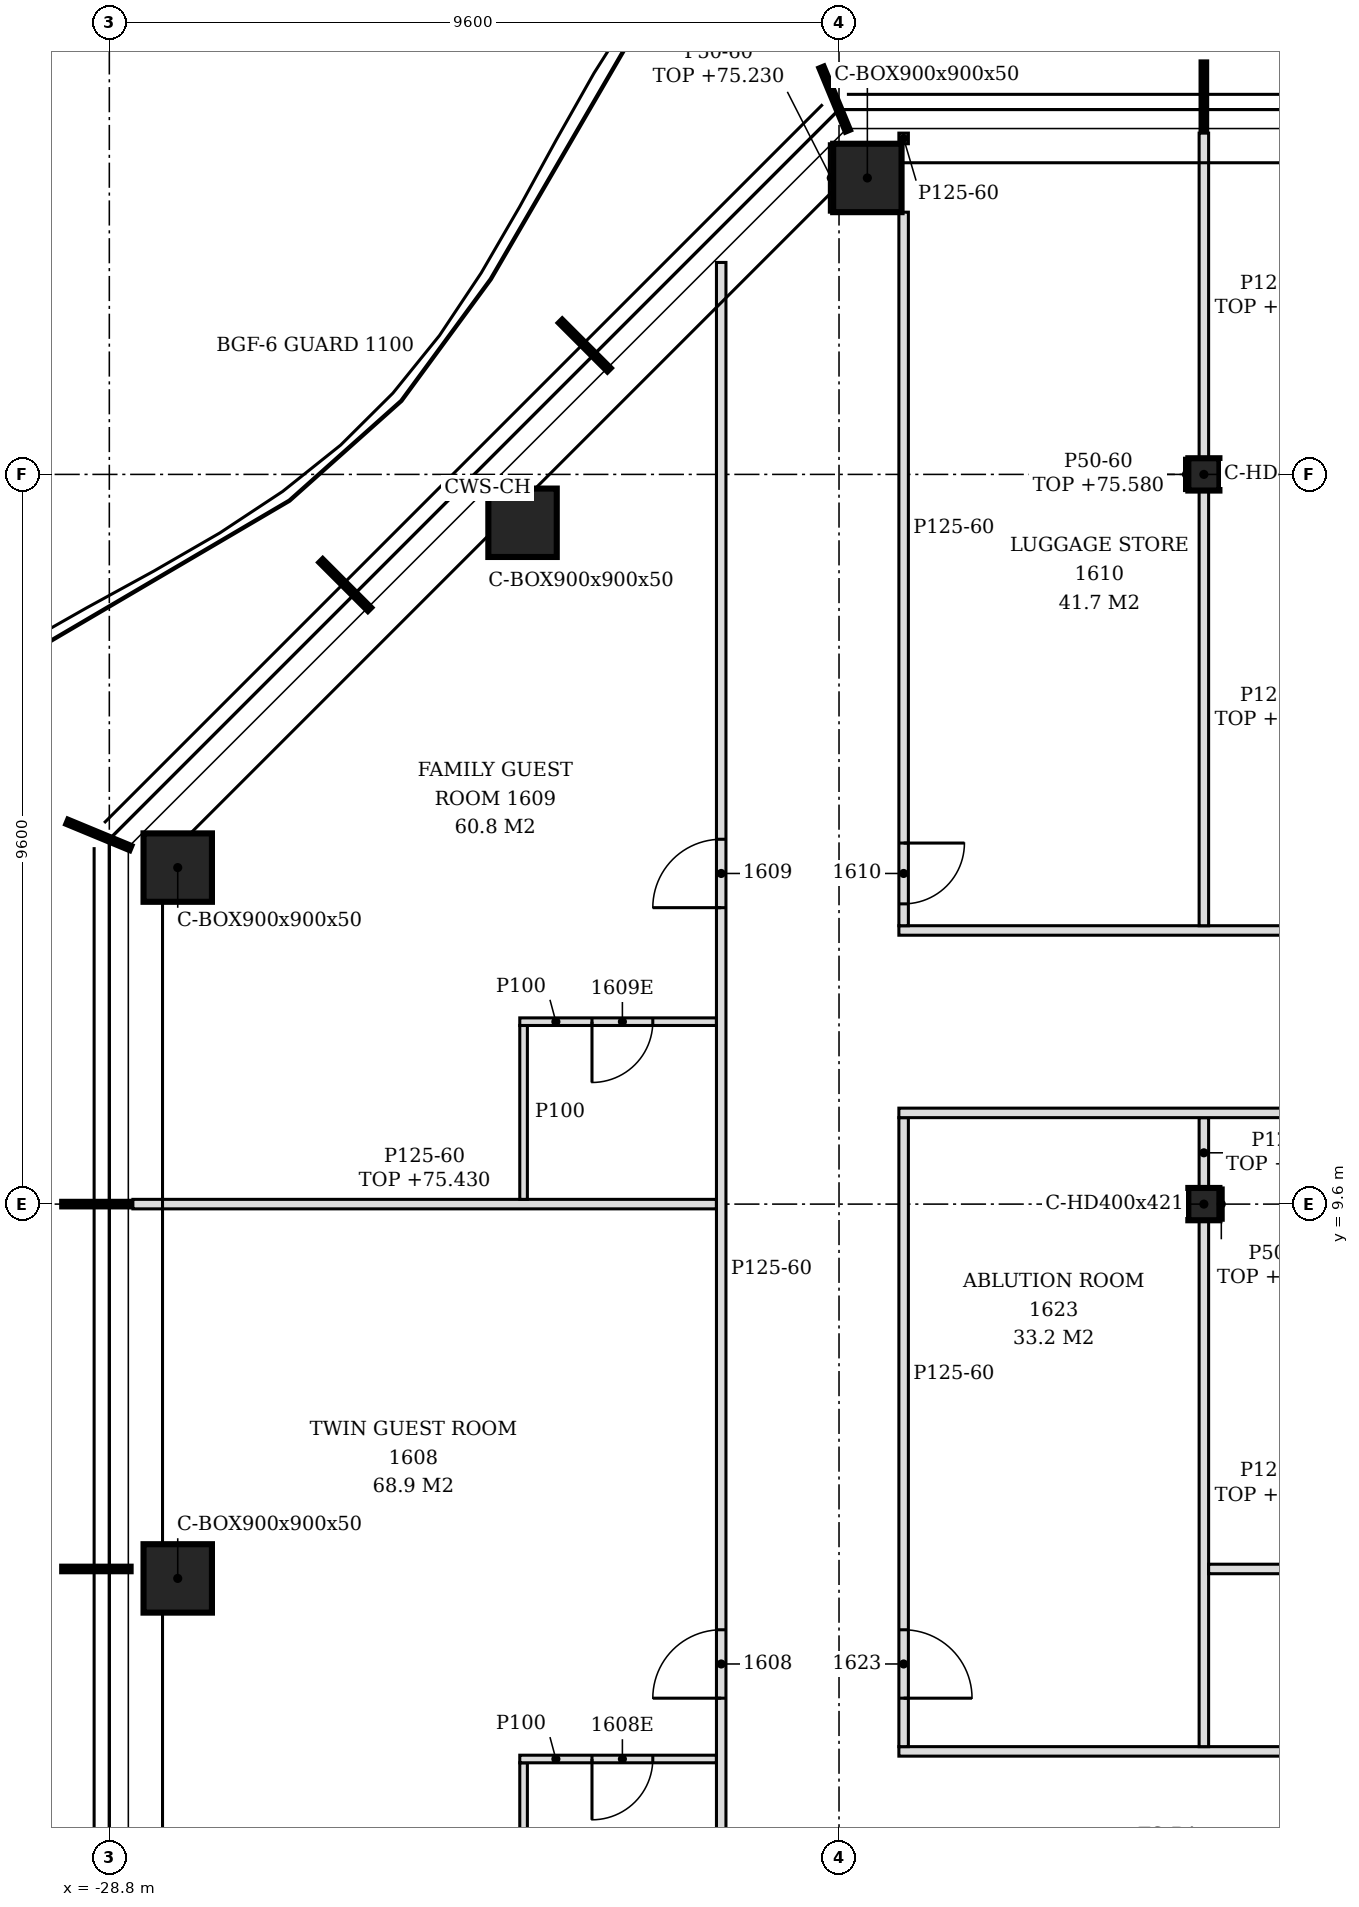
"""IFC4 building model, lengths in metres.
Left out: names, types, materials, properties, quantities, classifications, styles, units other than length and angle.
Written with IfcOpenShell. Run it as: python <this file> out.ifc"""

import sys

from ifc_helpers import new_model, si_unit, direction, frame, frame_2d, origin, origin_2d, place, context, subcontext, project, spatial, polyline, rectangle, hollow_rectangle, i_section, outline, extrude, element, fill, save


model = new_model("IFC4")
c1 = context("Model", 3, precision=1e-05, world=origin(), true_north=direction((0.0, 1.0)))
c2 = subcontext(c1, "Body", "Model", "MODEL_VIEW")
j1 = project(units=[si_unit("LENGTHUNIT", "METRE"), si_unit("PLANEANGLEUNIT", "RADIAN")], contexts=[c1])
p1 = place(None, origin())
s1 = spatial("IfcSite", under=j1, at=p1, CompositionType="ELEMENT")
p2 = place(p1, origin())
s2 = spatial("IfcBuilding", under=s1, at=p2, CompositionType="ELEMENT")
p3 = place(p2, frame((0.0, 0.0, 72.6)))
s3 = spatial("IfcBuildingStorey", under=s2, at=p3, CompositionType="ELEMENT", Elevation=72.6)
for number, where, z_axis, x_axis in (
    (1, (-18.827, 23.1, -0.15), (0.0, 0.0, 1.0), (1.0, 0.0, 0.0)),
    (2, (-23.364, 18.564, -0.15), (0.0, 0.0, 1.0), (1.0, 0.0, 0.0)),
    (3, (-27.9, 14.027, -0.15), (0.0, 0.0, 1.0), (1.0, 0.0, 0.0)),
    (4, (-27.9, 4.676, -0.15), (0.0, 0.0, 1.0), (1.0, 0.0, 0.0)),
):
    element("IfcColumn", number, at=place(p3, frame(where, z_axis=z_axis, x_axis=x_axis)), inside=s3, PredefinedType="COLUMN", context=c2, shape_type="SweptSolid", body=[
        extrude(hollow_rectangle(XDim=0.9, YDim=0.9, WallThickness=0.05, at=origin_2d()), origin(), (0.0, 0.0, 1.0), 3.6),
    ])
for number, where, z_axis, x_axis in (
    (5, (-14.4, 9.6, -0.15), (0.0, 0.0, 1.0), (1.0, 0.0, 0.0)),
    (6, (-14.4, 19.2, -0.15), (0.0, 0.0, 1.0), (1.0, 0.0, 0.0)),
):
    element("IfcColumn", number, at=place(p3, frame(where, z_axis=z_axis, x_axis=x_axis)), inside=s3, PredefinedType="COLUMN", context=c2, shape_type="SweptSolid", body=[
        extrude(i_section(OverallWidth=0.409, OverallDepth=0.425, WebThickness=0.033, FlangeThickness=0.052, FilletRadius=0.015, at=origin_2d()), origin(), (0.0, 0.0, 1.0), 3.6),
    ])
p4 = place(p3, frame((-20.75, -17.887, 0.0), z_axis=(0.0, 0.0, 1.0), x_axis=(0.0, 1.0, 0.0)))
e7 = element("IfcWall", 7, at=p4, inside=s3, PredefinedType="PARTITIONING", context=c2, shape_type="SweptSolid", body=[
    extrude(outline(polyline([(0.0, 0.0), (39.876, 0.0), (39.876, 3.45), (39.622, 3.45), (39.62, 2.63), (38.507, 2.63), (38.505, 3.45), (37.183, 3.45), (37.18, 2.98), (36.992, 2.98), (36.99, 3.45), (32.397, 3.45), (32.396, 2.83), (32.177, 2.83), (32.176, 3.45), (27.597, 3.45), (27.595, 2.83), (27.377, 2.83), (27.375, 3.45), (22.798, 3.45), (22.795, 2.83), (22.577, 2.83), (22.575, 3.45), (17.998, 3.45), (17.996, 2.83), (17.778, 2.83), (17.775, 3.45), (13.198, 3.45), (13.196, 2.83), (12.978, 2.83), (12.976, 3.45), (8.397, 3.45), (8.396, 2.83), (8.177, 2.83), (8.176, 3.45), (3.597, 3.45), (3.595, 2.83), (3.377, 2.83), (3.375, 3.45), (0.0, 3.45), (0.0, 0.0)])), frame((0.0, 0.062, 0.0), z_axis=(0.0, -1.0, 0.0), x_axis=(1.0, 0.0, 0.0)), (0.0, 0.0, 1.0), 0.125),
])
p5 = place(p4, frame((4.738, 0.0, 0.0)))
e8 = element("IfcOpeningElement", 8, at=p5, cuts=e7, PredefinedType="OPENING", context=c2, shape_type="SweptSolid", body=[
    extrude(rectangle(XDim=0.9, YDim=2.1, at=frame_2d((0.45, 1.05))), frame((0.0, 0.073, 0.0), z_axis=(0.0, -1.0, 0.0), x_axis=(1.0, 0.0, 0.0)), (0.0, 0.0, 1.0), 0.145),
])
p6 = place(p4, frame((13.387, 0.0, 0.0)))
e9 = element("IfcOpeningElement", 9, at=p6, cuts=e7, PredefinedType="OPENING", context=c2, shape_type="SweptSolid", body=[
    extrude(rectangle(XDim=0.9, YDim=2.1, at=frame_2d((0.45, 1.05))), frame((0.0, 0.073, 0.0), z_axis=(0.0, -1.0, 0.0), x_axis=(1.0, 0.0, 0.0)), (0.0, 0.0, 1.0), 0.145),
])
p7 = place(p4, frame((20.988, 0.0, 0.0)))
e10 = element("IfcOpeningElement", 10, at=p7, cuts=e7, PredefinedType="OPENING", context=c2, shape_type="SweptSolid", body=[
    extrude(rectangle(XDim=0.9, YDim=2.1, at=frame_2d((0.45, 1.05))), frame((0.0, 0.073, 0.0), z_axis=(0.0, -1.0, 0.0), x_axis=(1.0, 0.0, 0.0)), (0.0, 0.0, 1.0), 0.145),
])
p8 = place(p4, frame((31.387, 0.0, 0.0)))
e11 = element("IfcOpeningElement", 11, at=p8, cuts=e7, PredefinedType="OPENING", context=c2, shape_type="SweptSolid", body=[
    extrude(rectangle(XDim=0.9, YDim=2.1, at=frame_2d((0.45, 1.05))), frame((0.0, 0.073, 0.0), z_axis=(0.0, -1.0, 0.0), x_axis=(1.0, 0.0, 0.0)), (0.0, 0.0, 1.0), 0.145),
])
p9 = place(p3, frame((-23.35, 0.062, 0.0), z_axis=(0.0, 0.0, 1.0), x_axis=(0.0, 1.0, 0.0)))
e12 = element("IfcWall", 12, at=p9, inside=s3, PredefinedType="PARTITIONING", context=c2, shape_type="SweptSolid", body=[
    extrude(outline(polyline([(0.0, 0.0), (2.188, 0.0), (2.188, 3.45), (0.048, 3.45), (0.045, 2.83), (0.0, 2.83), (0.0, 0.0)])), frame((0.0, 0.05, 0.0), z_axis=(0.0, -1.0, 0.0), x_axis=(1.0, 0.0, 0.0)), (0.0, 0.0, 1.0), 0.1),
])
p10 = place(p3, frame((-23.4, 2.3, 0.0), z_axis=(0.0, 0.0, 1.0), x_axis=(1.0, 0.0, 0.0)))
e13 = element("IfcWall", 13, at=p10, inside=s3, PredefinedType="PARTITIONING", context=c2, shape_type="SweptSolid", body=[
    extrude(rectangle(XDim=2.587, YDim=0.1, at=frame_2d((1.294, 0.0))), origin(), (0.0, 0.0, 1.0), 3.45),
])
p11 = place(p10, frame((0.95, 0.0, 0.0)))
e14 = element("IfcOpeningElement", 14, at=p11, cuts=e13, PredefinedType="OPENING", context=c2, shape_type="SweptSolid", body=[
    extrude(rectangle(XDim=0.8, YDim=2.1, at=frame_2d((0.4, 1.05))), frame((0.0, 0.06, 0.0), z_axis=(0.0, -1.0, 0.0), x_axis=(1.0, 0.0, 0.0)), (0.0, 0.0, 1.0), 0.12),
])
p12 = place(p3, frame((-18.413, 2.4, 0.0), z_axis=(0.0, 0.0, 1.0), x_axis=(1.0, 0.0, 0.0)))
e15 = element("IfcWall", 15, at=p12, inside=s3, PredefinedType="PARTITIONING", context=c2, shape_type="SweptSolid", body=[
    extrude(outline(polyline([(0.0, 0.0), (13.401, 0.0), (13.4, 3.45), (4.163, 3.45), (4.16, 2.93), (3.863, 2.93), (3.861, 3.45), (0.0, 3.45), (0.0, 0.0)])), frame((0.0, 0.062, 0.0), z_axis=(0.0, -1.0, 0.0), x_axis=(1.0, 0.0, 0.0)), (0.0, 0.0, 1.0), 0.125),
])
p13 = place(p12, frame((11.812, 0.0, 0.0)))
e16 = element("IfcOpeningElement", 16, at=p13, cuts=e15, PredefinedType="OPENING", context=c2, shape_type="SweptSolid", body=[
    extrude(rectangle(XDim=0.8, YDim=2.1, at=frame_2d((0.4, 1.05))), frame((0.0, 0.073, 0.0), z_axis=(0.0, -1.0, 0.0), x_axis=(1.0, 0.0, 0.0)), (0.0, 0.0, 1.0), 0.145),
])
p14 = place(p3, frame((-18.35, 2.462, 0.0), z_axis=(0.0, 0.0, 1.0), x_axis=(0.0, 1.0, 0.0)))
e17 = element("IfcWall", 17, at=p14, inside=s3, PredefinedType="PARTITIONING", context=c2, shape_type="SweptSolid", body=[
    extrude(outline(polyline([(0.0, 0.0), (8.275, 0.0), (8.275, 3.45), (7.248, 3.45), (7.246, 2.83), (7.028, 2.83), (7.025, 3.45), (2.448, 3.45), (2.446, 2.83), (2.228, 2.83), (2.226, 3.45), (0.0, 3.45), (0.0, 0.0)])), frame((0.0, 0.062, 0.0), z_axis=(0.0, -1.0, 0.0), x_axis=(1.0, 0.0, 0.0)), (0.0, 0.0, 1.0), 0.125),
])
p15 = place(p14, frame((0.637, 0.0, 0.0)))
e18 = element("IfcOpeningElement", 18, at=p15, cuts=e17, PredefinedType="OPENING", context=c2, shape_type="SweptSolid", body=[
    extrude(rectangle(XDim=0.9, YDim=2.1, at=frame_2d((0.45, 1.05))), frame((0.0, 0.073, 0.0), z_axis=(0.0, -1.0, 0.0), x_axis=(1.0, 0.0, 0.0)), (0.0, 0.0, 1.0), 0.145),
])
p16 = place(p3, frame((-14.4, 2.462, 0.0), z_axis=(0.0, 0.0, 1.0), x_axis=(0.0, 1.0, 0.0)))
e19 = element("IfcWall", 19, at=p16, inside=s3, PredefinedType="PARTITIONING", context=c2, shape_type="SweptSolid", body=[
    extrude(rectangle(XDim=6.925, YDim=0.125, at=frame_2d((3.462, 0.0))), origin(), (0.0, 0.0, 1.0), 2.93),
])
p17 = place(p3, frame((-14.337, 4.8, 0.0), z_axis=(0.0, 0.0, 1.0), x_axis=(1.0, 0.0, 0.0)))
e20 = element("IfcWall", 20, at=p17, inside=s3, PredefinedType="PARTITIONING", context=c2, shape_type="SweptSolid", body=[
    extrude(outline(polyline([(0.0, 0.0), (9.475, 0.0), (9.475, 2.83), (9.387, 2.83), (9.385, 2.93), (0.0, 2.93), (0.0, 0.0)])), frame((0.0, 0.062, 0.0), z_axis=(0.0, -1.0, 0.0), x_axis=(1.0, 0.0, 0.0)), (0.0, 0.0, 1.0), 0.125),
])
p18 = place(p3, frame((-28.49, 9.6, 0.0), z_axis=(0.0, 0.0, 1.0), x_axis=(1.0, 0.0, 0.0)))
e21 = element("IfcWall", 21, at=p18, inside=s3, PredefinedType="PARTITIONING", context=c2, shape_type="SweptSolid", body=[
    extrude(rectangle(XDim=7.677, YDim=0.125, at=frame_2d((3.839, 0.0))), origin(), (0.0, 0.0, 1.0), 2.83),
])
p19 = place(p3, frame((-23.35, 9.663, 0.0), z_axis=(0.0, 0.0, 1.0), x_axis=(0.0, 1.0, 0.0)))
e22 = element("IfcWall", 22, at=p19, inside=s3, PredefinedType="PARTITIONING", context=c2, shape_type="SweptSolid", body=[
    extrude(outline(polyline([(0.0, 0.0), (2.287, 0.0), (2.288, 3.45), (0.048, 3.45), (0.045, 2.83), (0.0, 2.83), (0.0, 0.0)])), frame((0.0, 0.05, 0.0), z_axis=(0.0, -1.0, 0.0), x_axis=(1.0, 0.0, 0.0)), (0.0, 0.0, 1.0), 0.1),
])
p20 = place(p3, frame((-14.4, 9.812, 0.0), z_axis=(0.0, 0.0, 1.0), x_axis=(0.0, 1.0, 0.0)))
e23 = element("IfcWall", 23, at=p20, inside=s3, PredefinedType="PARTITIONING", context=c2, shape_type="SweptSolid", body=[
    extrude(rectangle(XDim=0.925, YDim=0.125, at=frame_2d((0.462, 0.0))), origin(), (0.0, 0.0, 1.0), 2.93),
])
p21 = place(p3, frame((-18.413, 10.8, 0.0), z_axis=(0.0, 0.0, 1.0), x_axis=(1.0, 0.0, 0.0)))
e24 = element("IfcWall", 24, at=p21, inside=s3, PredefinedType="PARTITIONING", context=c2, shape_type="SweptSolid", body=[
    extrude(outline(polyline([(0.0, 0.0), (13.675, 0.0), (13.675, 2.83), (13.462, 2.83), (13.46, 3.45), (4.163, 3.45), (4.16, 2.93), (3.863, 2.93), (3.861, 3.45), (0.0, 3.45), (0.0, 0.0)])), frame((0.0, 0.062, 0.0), z_axis=(0.0, -1.0, 0.0), x_axis=(1.0, 0.0, 0.0)), (0.0, 0.0, 1.0), 0.125),
])
p22 = place(p21, frame((12.512, 0.0, 0.0)))
e25 = element("IfcOpeningElement", 25, at=p22, cuts=e24, PredefinedType="OPENING", context=c2, shape_type="SweptSolid", body=[
    extrude(rectangle(XDim=0.8, YDim=2.1, at=frame_2d((0.4, 1.05))), frame((0.0, 0.073, 0.0), z_axis=(0.0, -1.0, 0.0), x_axis=(1.0, 0.0, 0.0)), (0.0, 0.0, 1.0), 0.145),
])
p23 = place(p3, frame((-23.4, 12.0, 0.0), z_axis=(0.0, 0.0, 1.0), x_axis=(1.0, 0.0, 0.0)))
e26 = element("IfcWall", 26, at=p23, inside=s3, PredefinedType="PARTITIONING", context=c2, shape_type="SweptSolid", body=[
    extrude(rectangle(XDim=2.587, YDim=0.1, at=frame_2d((1.294, 0.0))), origin(), (0.0, 0.0, 1.0), 3.45),
])
p24 = place(p23, frame((0.95, 0.0, 0.0)))
e27 = element("IfcOpeningElement", 27, at=p24, cuts=e26, PredefinedType="OPENING", context=c2, shape_type="SweptSolid", body=[
    extrude(rectangle(XDim=0.8, YDim=2.1, at=frame_2d((0.4, 1.05))), frame((0.0, 0.06, 0.0), z_axis=(0.0, -1.0, 0.0), x_axis=(1.0, 0.0, 0.0)), (0.0, 0.0, 1.0), 0.12),
])
p25 = place(p3, frame((-18.413, 13.2, 0.0), z_axis=(0.0, 0.0, 1.0), x_axis=(1.0, 0.0, 0.0)))
e28 = element("IfcWall", 28, at=p25, inside=s3, PredefinedType="PARTITIONING", context=c2, shape_type="SweptSolid", body=[
    extrude(outline(polyline([(0.0, 0.0), (13.401, 0.0), (13.4, 3.45), (4.163, 3.45), (4.16, 2.93), (3.863, 2.93), (3.861, 3.45), (0.0, 3.45), (0.0, 0.0)])), frame((0.0, 0.062, 0.0), z_axis=(0.0, -1.0, 0.0), x_axis=(1.0, 0.0, 0.0)), (0.0, 0.0, 1.0), 0.125),
])
p26 = place(p25, frame((11.312, 0.0, 0.0)))
e29 = element("IfcOpeningElement", 29, at=p26, cuts=e28, PredefinedType="OPENING", context=c2, shape_type="SweptSolid", body=[
    extrude(rectangle(XDim=1.8, YDim=2.1, at=frame_2d((0.9, 1.05))), frame((0.0, 0.073, 0.0), z_axis=(0.0, -1.0, 0.0), x_axis=(1.0, 0.0, 0.0)), (0.0, 0.0, 1.0), 0.145),
])
p27 = place(p3, frame((-18.35, 13.262, 0.0), z_axis=(0.0, 0.0, 1.0), x_axis=(0.0, 1.0, 0.0)))
e30 = element("IfcWall", 30, at=p27, inside=s3, PredefinedType="PARTITIONING", context=c2, shape_type="SweptSolid", body=[
    extrude(outline(polyline([(0.0, 0.0), (9.387, 0.0), (9.387, 3.45), (6.032, 3.45), (6.031, 2.98), (5.843, 2.98), (5.841, 3.45), (1.248, 3.45), (1.246, 2.83), (1.028, 2.83), (1.025, 3.45), (0.0, 3.45), (0.0, 0.0)])), frame((0.0, 0.062, 0.0), z_axis=(0.0, -1.0, 0.0), x_axis=(1.0, 0.0, 0.0)), (0.0, 0.0, 1.0), 0.125),
])
p28 = place(p27, frame((0.288, 0.0, 0.0)))
e31 = element("IfcOpeningElement", 31, at=p28, cuts=e30, PredefinedType="OPENING", context=c2, shape_type="SweptSolid", body=[
    extrude(rectangle(XDim=0.8, YDim=2.1, at=frame_2d((0.4, 1.05))), frame((0.0, 0.073, 0.0), z_axis=(0.0, -1.0, 0.0), x_axis=(1.0, 0.0, 0.0)), (0.0, 0.0, 1.0), 0.145),
])
p29 = place(p3, frame((-14.4, 13.262, 0.0), z_axis=(0.0, 0.0, 1.0), x_axis=(0.0, 1.0, 0.0)))
e32 = element("IfcWall", 32, at=p29, inside=s3, PredefinedType="PARTITIONING", context=c2, shape_type="SweptSolid", body=[
    extrude(rectangle(XDim=5.725, YDim=0.125, at=frame_2d((2.863, 0.0))), origin(), (0.0, 0.0, 1.0), 2.93),
])
p30 = place(p3, frame((-14.4, 19.413, 0.0), z_axis=(0.0, 0.0, 1.0), x_axis=(0.0, 1.0, 0.0)))
e33 = element("IfcWall", 33, at=p30, inside=s3, PredefinedType="PARTITIONING", context=c2, shape_type="SweptSolid", body=[
    extrude(outline(polyline([(0.0, 0.0), (4.277, 0.0), (4.278, 3.03), (3.837, 3.03), (3.835, 2.93), (3.538, 2.93), (3.535, 3.03), (0.0, 3.03), (0.0, 0.0)])), frame((0.0, 0.062, 0.0), z_axis=(0.0, -1.0, 0.0), x_axis=(1.0, 0.0, 0.0)), (0.0, 0.0, 1.0), 0.125),
])
p31 = place(p3, frame((-18.35, 23.55, 0.0), z_axis=(0.0, 0.0, 1.0), x_axis=(0.0, 1.0, 0.0)))
e34 = element("IfcWall", 34, at=p31, inside=s3, PredefinedType="PARTITIONING", context=c2, shape_type="SweptSolid", body=[
    extrude(rectangle(XDim=0.14, YDim=0.125, at=frame_2d((0.07, 0.0))), origin(), (0.0, 0.0, 1.0), 3.45),
])
p32 = place(p3, frame((-14.17, 9.387, 0.0), z_axis=(0.0, 0.0, 1.0), x_axis=(0.0, 1.0, 0.0)))
e35 = element("IfcWall", 35, at=p32, inside=s3, PredefinedType="PARTITIONING", context=c2, shape_type="SweptSolid", body=[
    extrude(rectangle(XDim=0.425, YDim=0.05, at=frame_2d((0.212, 0.0))), origin(), (0.0, 0.0, 1.0), 2.93),
])
p33 = place(p3, frame((-19.302, 22.65, 0.0), z_axis=(0.0, 0.0, 1.0), x_axis=(0.0, 1.0, 0.0)))
e36 = element("IfcWall", 36, at=p33, inside=s3, PredefinedType="PARTITIONING", context=c2, shape_type="SweptSolid", body=[
    extrude(rectangle(XDim=0.9, YDim=0.05, at=frame_2d((0.45, 0.0))), origin(), (0.0, 0.0, 1.0), 2.63),
])
p34 = place(p3, frame((-14.629, 18.988, 0.0), z_axis=(0.0, 0.0, 1.0), x_axis=(0.0, 1.0, 0.0)))
e37 = element("IfcWall", 37, at=p34, inside=s3, PredefinedType="PARTITIONING", context=c2, shape_type="SweptSolid", body=[
    extrude(rectangle(XDim=0.425, YDim=0.05, at=frame_2d((0.212, 0.0))), origin(), (0.0, 0.0, 1.0), 2.98),
])
p35 = place(p7, origin())
e38 = element("IfcDoor", 38, at=p35, inside=s3, OperationType="SINGLE_SWING_LEFT", PredefinedType="DOOR", context=c2, shape_type="SweptSolid", body=[
    extrude(rectangle(XDim=0.9, YDim=2.1, at=frame_2d((0.45, 1.05))), frame((0.0, 0.025, 0.0), z_axis=(0.0, -1.0, 0.0), x_axis=(1.0, 0.0, 0.0)), (0.0, 0.0, 1.0), 0.05),
])
fill(e10, e38)
p36 = place(p11, frame((0.8, 0.0, 0.0), z_axis=(0.0, 0.0, 1.0), x_axis=(-1.0, 0.0, 0.0)))
e39 = element("IfcDoor", 39, at=p36, inside=s3, OperationType="SINGLE_SWING_RIGHT", PredefinedType="DOOR", context=c2, shape_type="SweptSolid", body=[
    extrude(rectangle(XDim=0.8, YDim=2.1, at=frame_2d((0.4, 1.05))), frame((0.0, 0.025, 0.0), z_axis=(0.0, -1.0, 0.0), x_axis=(1.0, 0.0, 0.0)), (0.0, 0.0, 1.0), 0.05),
])
fill(e14, e39)
p37 = place(p8, origin())
e40 = element("IfcDoor", 40, at=p37, inside=s3, OperationType="SINGLE_SWING_LEFT", PredefinedType="DOOR", context=c2, shape_type="SweptSolid", body=[
    extrude(rectangle(XDim=0.9, YDim=2.1, at=frame_2d((0.45, 1.05))), frame((0.0, 0.025, 0.0), z_axis=(0.0, -1.0, 0.0), x_axis=(1.0, 0.0, 0.0)), (0.0, 0.0, 1.0), 0.05),
])
fill(e11, e40)
p38 = place(p24, frame((0.8, 0.0, 0.0), z_axis=(0.0, 0.0, 1.0), x_axis=(-1.0, 0.0, 0.0)))
e41 = element("IfcDoor", 41, at=p38, inside=s3, OperationType="SINGLE_SWING_RIGHT", PredefinedType="DOOR", context=c2, shape_type="SweptSolid", body=[
    extrude(rectangle(XDim=0.8, YDim=2.1, at=frame_2d((0.4, 1.05))), frame((0.0, 0.025, 0.0), z_axis=(0.0, -1.0, 0.0), x_axis=(1.0, 0.0, 0.0)), (0.0, 0.0, 1.0), 0.05),
])
fill(e27, e41)
p39 = place(p28, frame((0.8, 0.0, 0.0), z_axis=(0.0, 0.0, 1.0), x_axis=(-1.0, 0.0, 0.0)))
e42 = element("IfcDoor", 42, at=p39, inside=s3, OperationType="SINGLE_SWING_LEFT", PredefinedType="DOOR", context=c2, shape_type="SweptSolid", body=[
    extrude(rectangle(XDim=0.8, YDim=2.1, at=frame_2d((0.4, 1.05))), frame((0.0, 0.025, 0.0), z_axis=(0.0, -1.0, 0.0), x_axis=(1.0, 0.0, 0.0)), (0.0, 0.0, 1.0), 0.05),
])
fill(e31, e42)
p40 = place(p15, frame((0.9, 0.0, 0.0), z_axis=(0.0, 0.0, 1.0), x_axis=(-1.0, 0.0, 0.0)))
e43 = element("IfcDoor", 43, at=p40, inside=s3, OperationType="SINGLE_SWING_RIGHT", PredefinedType="DOOR", context=c2, shape_type="SweptSolid", body=[
    extrude(rectangle(XDim=0.9, YDim=2.1, at=frame_2d((0.45, 1.05))), frame((0.0, 0.025, 0.0), z_axis=(0.0, -1.0, 0.0), x_axis=(1.0, 0.0, 0.0)), (0.0, 0.0, 1.0), 0.05),
])
fill(e18, e43)
save(model, sys.argv[1])
